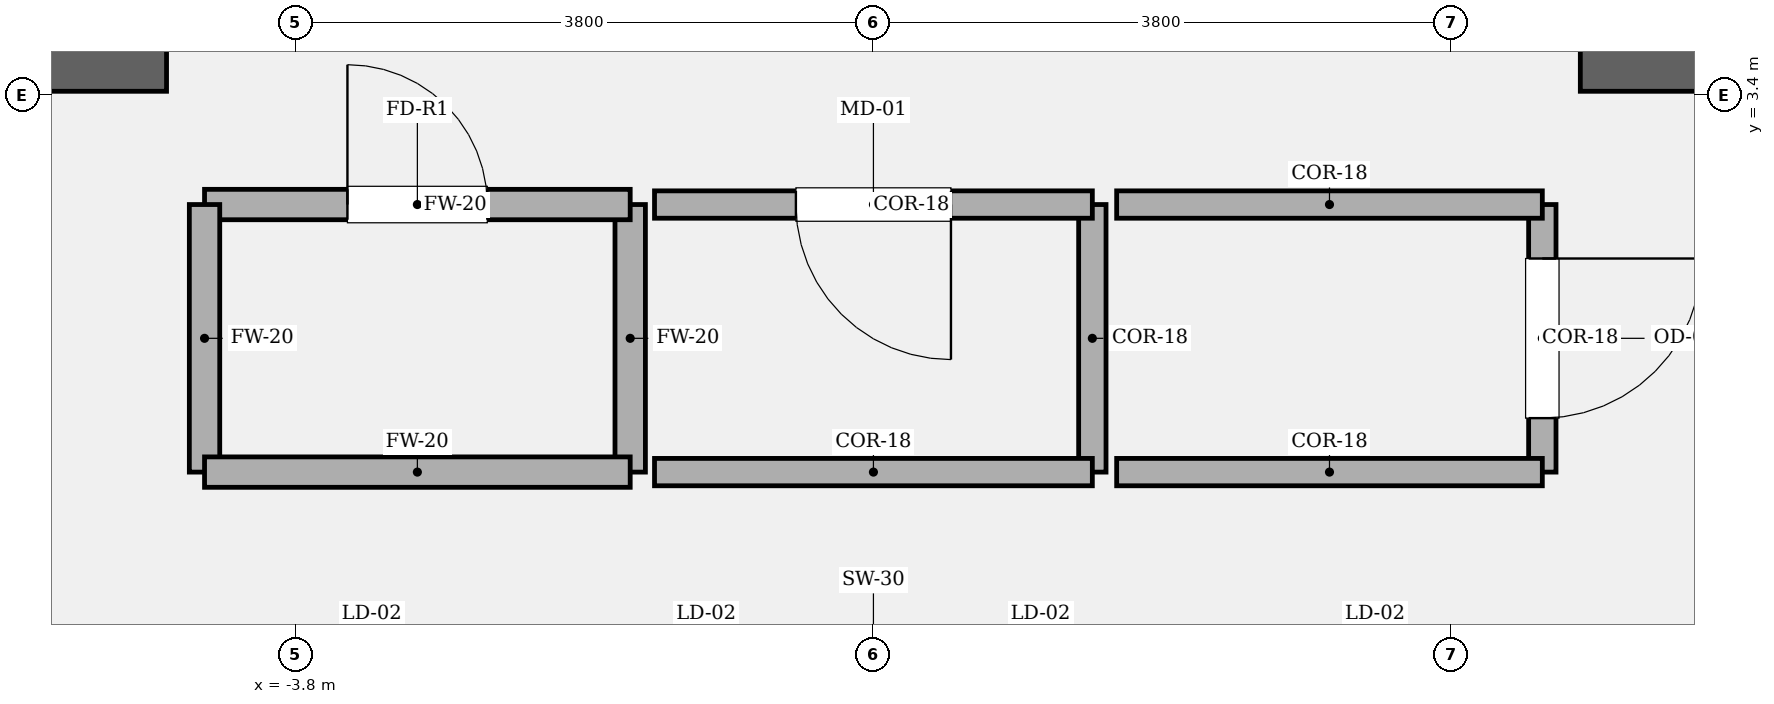
"""IFC4 building model, lengths in metres.
Left out: names, types, materials, properties, quantities, classifications, styles, units other than length and angle.
Written with IfcOpenShell. Run it as: python <this file> out.ifc"""

import sys

from ifc_helpers import new_model, si_unit, direction, frame, frame_2d, origin, place, context, subcontext, project, spatial, rectangle, extrude, element, fill, save


model = new_model("IFC4")
c1 = context("Model", 3, precision=1e-05, world=origin(), true_north=direction((0.0, 1.0)))
c2 = subcontext(c1, "Body", "Model", "MODEL_VIEW")
j1 = project(units=[si_unit("LENGTHUNIT", "METRE"), si_unit("PLANEANGLEUNIT", "RADIAN")], contexts=[c1])
p1 = place(None, origin())
s1 = spatial("IfcSite", under=j1, at=p1, CompositionType="ELEMENT")
p2 = place(p1, origin())
s2 = spatial("IfcBuilding", under=s1, at=p2, CompositionType="ELEMENT")
p3 = place(p2, frame((0.0, 0.0, 93.0)))
s3 = spatial("IfcBuildingStorey", under=s2, at=p3, CompositionType="ELEMENT", Elevation=93.0)
for number, where, z_axis, x_axis in (
    (1, (-9.825, 3.6, 0.0), (0.0, 0.0, 1.0), (1.0, 0.0, 0.0)),
    (2, (4.65, 3.6, 0.0), (0.0, 0.0, 1.0), (1.0, 0.0, 0.0)),
):
    element("IfcWall", number, at=place(p3, frame(where, z_axis=z_axis, x_axis=x_axis)), inside=s3, PredefinedType="SOLIDWALL", context=c2, shape_type="SweptSolid", body=[
        extrude(rectangle(XDim=5.175, YDim=0.35, at=frame_2d((2.587, 0.0))), origin(), (0.0, 0.0, 1.0), 4.05),
    ])
p4 = place(p3, frame((-1.6, 0.92, 0.0), z_axis=(0.0, 0.0, 1.0), x_axis=(0.0, 1.0, 0.0)))
e3 = element("IfcWall", 3, at=p4, inside=s3, PredefinedType="SOLIDWALL", context=c2, shape_type="SweptSolid", body=[
    extrude(rectangle(XDim=1.76, YDim=0.2, at=frame_2d((0.88, 0.0))), origin(), (0.0, 0.0, 1.0), 3.81),
])
p5 = place(p3, frame((-1.6, 2.68, 0.0), z_axis=(0.0, 0.0, 1.0), x_axis=(-1.0, 0.0, 0.0)))
e4 = element("IfcWall", 4, at=p5, inside=s3, PredefinedType="SOLIDWALL", context=c2, shape_type="SweptSolid", body=[
    extrude(rectangle(XDim=2.8, YDim=0.2, at=frame_2d((1.4, 0.0))), origin(), (0.0, 0.0, 1.0), 3.81),
])
p6 = place(p5, frame((0.94, 0.0, 0.0)))
e5 = element("IfcOpeningElement", 5, at=p6, cuts=e4, PredefinedType="OPENING", context=c2, shape_type="SweptSolid", body=[
    extrude(rectangle(XDim=0.92, YDim=2.1, at=frame_2d((0.46, 1.05))), frame((0.0, 0.11, 0.0), z_axis=(0.0, -1.0, 0.0), x_axis=(1.0, 0.0, 0.0)), (0.0, 0.0, 1.0), 0.22),
])
p7 = place(p3, frame((-4.4, 2.68, 0.0), z_axis=(0.0, 0.0, 1.0), x_axis=(0.0, -1.0, 0.0)))
e6 = element("IfcWall", 6, at=p7, inside=s3, PredefinedType="SOLIDWALL", context=c2, shape_type="SweptSolid", body=[
    extrude(rectangle(XDim=1.76, YDim=0.2, at=frame_2d((0.88, 0.0))), origin(), (0.0, 0.0, 1.0), 3.81),
])
p8 = place(p3, frame((-4.4, 0.92, 0.0), z_axis=(0.0, 0.0, 1.0), x_axis=(1.0, 0.0, 0.0)))
e7 = element("IfcWall", 7, at=p8, inside=s3, PredefinedType="SOLIDWALL", context=c2, shape_type="SweptSolid", body=[
    extrude(rectangle(XDim=2.8, YDim=0.2, at=frame_2d((1.4, 0.0))), origin(), (0.0, 0.0, 1.0), 3.81),
])
p9 = place(p3, frame((1.44, 0.92, 0.0), z_axis=(0.0, 0.0, 1.0), x_axis=(0.0, 1.0, 0.0)))
e8 = element("IfcWall", 8, at=p9, inside=s3, PredefinedType="PARTITIONING", context=c2, shape_type="SweptSolid", body=[
    extrude(rectangle(XDim=1.76, YDim=0.18, at=frame_2d((0.88, 0.0))), origin(), (0.0, 0.0, 1.0), 3.81),
])
p10 = place(p3, frame((1.44, 2.68, 0.0), z_axis=(0.0, 0.0, 1.0), x_axis=(-1.0, 0.0, 0.0)))
e9 = element("IfcWall", 9, at=p10, inside=s3, PredefinedType="PARTITIONING", context=c2, shape_type="SweptSolid", body=[
    extrude(rectangle(XDim=2.88, YDim=0.18, at=frame_2d((1.44, 0.0))), origin(), (0.0, 0.0, 1.0), 3.81),
])
p11 = place(p10, frame((0.93, 0.0, 0.0)))
e10 = element("IfcOpeningElement", 10, at=p11, cuts=e9, PredefinedType="OPENING", context=c2, shape_type="SweptSolid", body=[
    extrude(rectangle(XDim=1.02, YDim=2.2, at=frame_2d((0.51, 1.1))), frame((0.0, 0.1, 0.0), z_axis=(0.0, -1.0, 0.0), x_axis=(1.0, 0.0, 0.0)), (0.0, 0.0, 1.0), 0.2),
])
p12 = place(p3, frame((-1.44, 0.92, 0.0), z_axis=(0.0, 0.0, 1.0), x_axis=(1.0, 0.0, 0.0)))
e11 = element("IfcWall", 11, at=p12, inside=s3, PredefinedType="PARTITIONING", context=c2, shape_type="SweptSolid", body=[
    extrude(rectangle(XDim=2.88, YDim=0.18, at=frame_2d((1.44, 0.0))), origin(), (0.0, 0.0, 1.0), 3.81),
])
p13 = place(p3, frame((4.4, 0.92, 0.0), z_axis=(0.0, 0.0, 1.0), x_axis=(0.0, 1.0, 0.0)))
e12 = element("IfcWall", 12, at=p13, inside=s3, PredefinedType="PARTITIONING", context=c2, shape_type="SweptSolid", body=[
    extrude(rectangle(XDim=1.76, YDim=0.18, at=frame_2d((0.88, 0.0))), origin(), (0.0, 0.0, 1.0), 3.81),
])
p14 = place(p13, frame((0.355, 0.0, 0.0)))
e13 = element("IfcOpeningElement", 13, at=p14, cuts=e12, PredefinedType="OPENING", context=c2, shape_type="SweptSolid", body=[
    extrude(rectangle(XDim=1.05, YDim=2.2, at=frame_2d((0.525, 1.1))), frame((0.0, 0.1, 0.0), z_axis=(0.0, -1.0, 0.0), x_axis=(1.0, 0.0, 0.0)), (0.0, 0.0, 1.0), 0.2),
])
for number, where, z_axis, x_axis in (
    (14, (4.4, 2.68, 0.0), (0.0, 0.0, 1.0), (-1.0, 0.0, 0.0)),
    (15, (1.6, 0.92, 0.0), (0.0, 0.0, 1.0), (1.0, 0.0, 0.0)),
):
    element("IfcWall", number, at=place(p3, frame(where, z_axis=z_axis, x_axis=x_axis)), inside=s3, PredefinedType="PARTITIONING", context=c2, shape_type="SweptSolid", body=[
        extrude(rectangle(XDim=2.8, YDim=0.18, at=frame_2d((1.4, 0.0))), origin(), (0.0, 0.0, 1.0), 3.81),
    ])
p15 = place(p6, origin())
e16 = element("IfcDoor", 16, at=p15, inside=s3, OperationType="SINGLE_SWING_RIGHT", PredefinedType="DOOR", context=c2, shape_type="SweptSolid", body=[
    extrude(rectangle(XDim=0.92, YDim=2.1, at=frame_2d((0.46, 1.05))), frame((0.0, 0.025, 0.0), z_axis=(0.0, -1.0, 0.0), x_axis=(1.0, 0.0, 0.0)), (0.0, 0.0, 1.0), 0.05),
])
fill(e5, e16)
p16 = place(p11, origin())
e17 = element("IfcDoor", 17, at=p16, inside=s3, OperationType="SINGLE_SWING_LEFT", PredefinedType="DOOR", context=c2, shape_type="SweptSolid", body=[
    extrude(rectangle(XDim=1.02, YDim=2.2, at=frame_2d((0.51, 1.1))), frame((0.0, 0.025, 0.0), z_axis=(0.0, -1.0, 0.0), x_axis=(1.0, 0.0, 0.0)), (0.0, 0.0, 1.0), 0.05),
])
fill(e10, e17)
p17 = place(p14, origin())
e18 = element("IfcDoor", 18, at=p17, inside=s3, OperationType="SINGLE_SWING_RIGHT", PredefinedType="DOOR", context=c2, shape_type="SweptSolid", body=[
    extrude(rectangle(XDim=1.05, YDim=2.2, at=frame_2d((0.525, 1.1))), frame((0.0, 0.025, 0.0), z_axis=(0.0, -1.0, 0.0), x_axis=(1.0, 0.0, 0.0)), (0.0, 0.0, 1.0), 0.05),
])
fill(e13, e18)
save(model, sys.argv[1])
